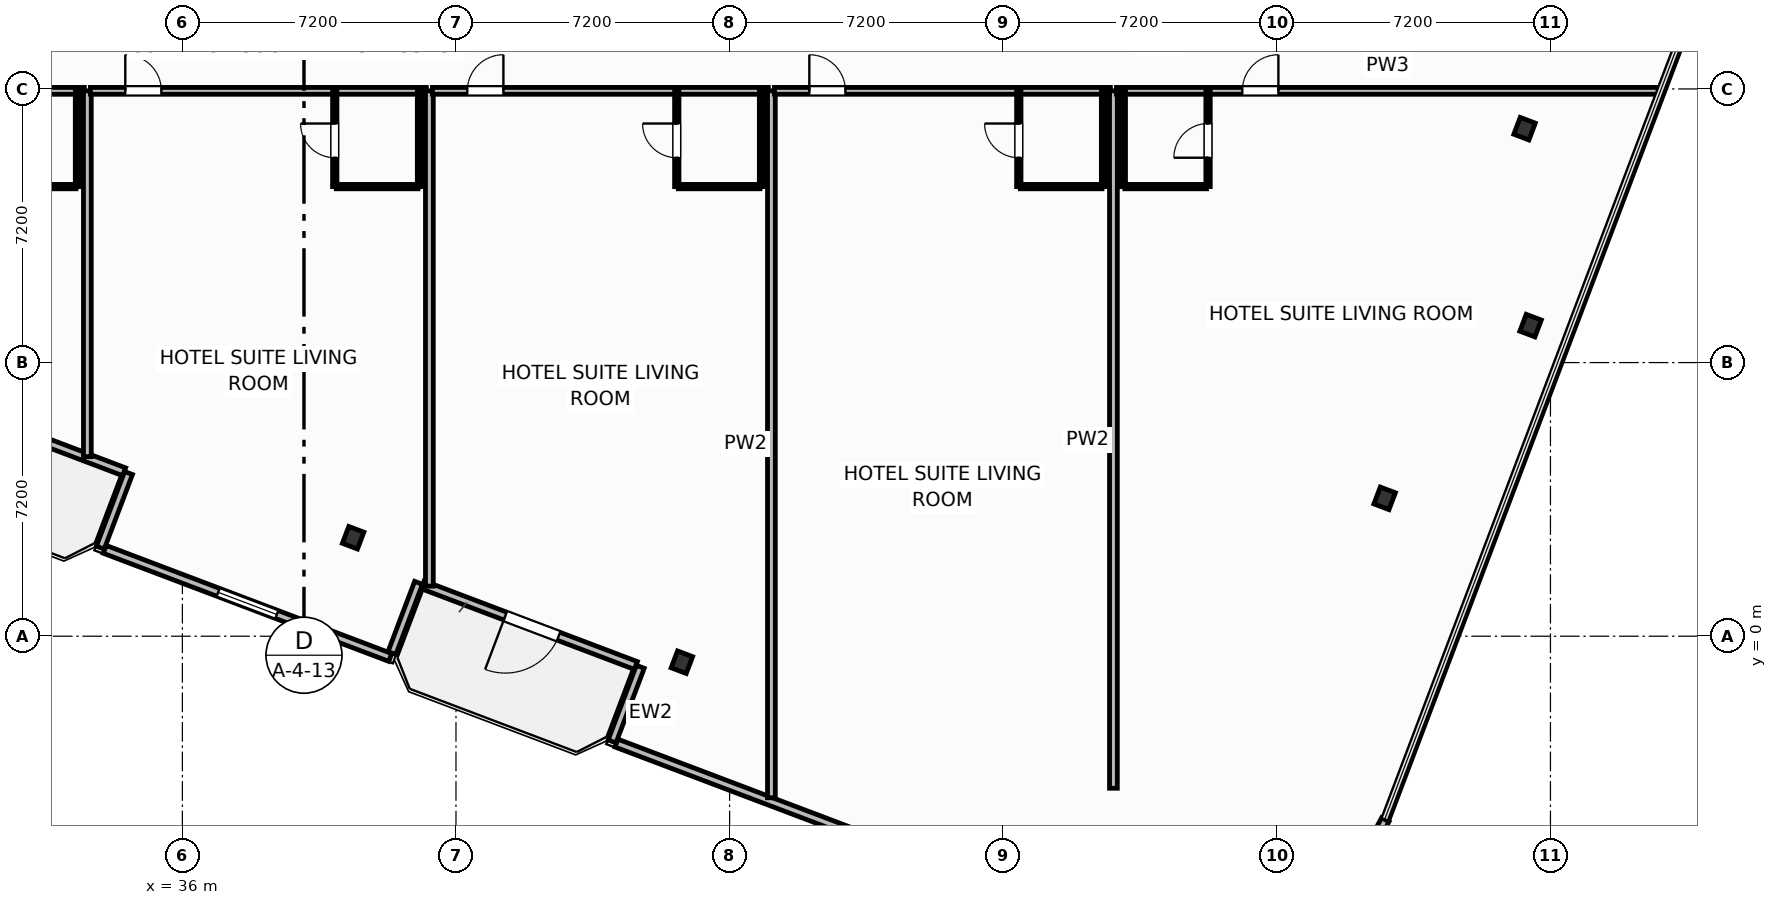
"""IFC4 building model, lengths in metres.
Left out: names, types, materials, properties, quantities, classifications, styles, units other than length and angle.
Written with IfcOpenShell. Run it as: python <this file> out.ifc"""

import sys

from ifc_helpers import new_model, si_unit, direction, frame, frame_2d, origin, origin_2d, place, context, subcontext, project, spatial, rectangle, i_section, extrude, element, fill, save


model = new_model("IFC4")
c1 = context("Model", 3, precision=1e-05, world=origin(), true_north=direction((0.0, 1.0)))
c2 = subcontext(c1, "Body", "Model", "MODEL_VIEW")
j1 = project(units=[si_unit("LENGTHUNIT", "METRE"), si_unit("PLANEANGLEUNIT", "RADIAN")], contexts=[c1])
p1 = place(None, origin())
s1 = spatial("IfcSite", under=j1, at=p1, CompositionType="ELEMENT")
p2 = place(p1, origin())
s2 = spatial("IfcBuilding", under=s1, at=p2, CompositionType="ELEMENT")
p3 = place(p2, frame((0.0, 0.0, 109.5)))
s3 = spatial("IfcBuildingStorey", under=s2, at=p3, CompositionType="ELEMENT", Elevation=109.5)
for number, where, z_axis, x_axis in (
    (1, (40.493, 2.591, 0.0), (0.0, 0.0, 1.0), (0.935, -0.354, 0.0)),
    (2, (49.144, -0.684, 0.0), (0.0, 0.0, 1.0), (0.935, -0.354, 0.0)),
    (3, (67.637, 3.628, 0.0), (0.0, 0.0, 1.0), (0.935, -0.354, 0.0)),
    (4, (71.477, 8.173, 0.0), (0.0, 0.0, 1.0), (0.935, -0.354, 0.0)),
    (5, (71.319, 13.354, 0.0), (0.0, 0.0, 1.0), (0.935, -0.354, 0.0)),
):
    element("IfcColumn", number, at=place(p3, frame(where, z_axis=z_axis, x_axis=x_axis)), inside=s3, PredefinedType="COLUMN", context=c2, shape_type="SweptSolid", body=[
        extrude(i_section(OverallWidth=0.424, OverallDepth=0.474, WebThickness=0.048, FlangeThickness=0.077, FilletRadius=0.025, at=origin_2d()), origin(), (0.0, 0.0, 1.0), 3.7),
    ])
p4 = place(p3, frame((34.468, 4.327, 0.0), z_axis=(0.0, 0.0, 1.0), x_axis=(-0.9352192676, 0.354069091436, 0.0)))
e6 = element("IfcWall", 6, at=p4, inside=s3, PredefinedType="SOLIDWALL", context=c2, shape_type="SweptSolid", body=[
    extrude(rectangle(XDim=6.0, YDim=0.22, at=frame_2d((3.0, 0.0))), origin(), (0.0, 0.0, 1.0), 2.73),
])
p5 = place(p4, frame((3.508, 0.0, 0.0)))
e7 = element("IfcOpeningElement", 7, at=p5, cuts=e6, PredefinedType="OPENING", context=c2, shape_type="SweptSolid", body=[
    extrude(rectangle(XDim=1.5, YDim=2.25, at=frame_2d((0.75, 1.125))), frame((0.0, 0.12, 0.0), z_axis=(0.0, -1.0, 0.0), x_axis=(1.0, 0.0, 0.0)), (0.0, 0.0, 1.0), 0.24),
])
p6 = place(p3, frame((47.935, -0.771, 0.0), z_axis=(0.0, 0.0, 1.0), x_axis=(-0.935227640088, 0.354046976001, 0.0)))
e8 = element("IfcWall", 8, at=p6, inside=s3, PredefinedType="SOLIDWALL", context=c2, shape_type="SweptSolid", body=[
    extrude(rectangle(XDim=6.0, YDim=0.22, at=frame_2d((3.0, 0.0))), origin(), (0.0, 0.0, 1.0), 2.73),
])
p7 = place(p6, frame((2.176, 0.0, 0.0)))
e9 = element("IfcOpeningElement", 9, at=p7, cuts=e8, PredefinedType="OPENING", context=c2, shape_type="SweptSolid", body=[
    extrude(rectangle(XDim=1.5, YDim=2.25, at=frame_2d((0.75, 1.125))), frame((0.0, 0.12, 0.0), z_axis=(0.0, -1.0, 0.0), x_axis=(1.0, 0.0, 0.0)), (0.0, 0.0, 1.0), 0.24),
])
p8 = place(p3, frame((34.583, 4.294, 0.0), z_axis=(0.0, 0.0, 1.0), x_axis=(-0.354128469405, -0.935196785258, 0.0)))
e10 = element("IfcWall", 10, at=p8, inside=s3, PredefinedType="SOLIDWALL", context=c2, shape_type="SweptSolid", body=[
    extrude(rectangle(XDim=2.1, YDim=0.22, at=frame_2d((1.05, 0.0))), origin(), (0.0, 0.0, 1.0), 2.73),
])
p9 = place(p3, frame((33.957, 2.286, 0.0), z_axis=(0.0, 0.0, 1.0), x_axis=(0.935220736163, -0.354065212427, 0.0)))
e11 = element("IfcWall", 11, at=p9, inside=s3, PredefinedType="SOLIDWALL", context=c2, shape_type="SweptSolid", body=[
    extrude(rectangle(XDim=8.035, YDim=0.22, at=frame_2d((4.018, 0.0))), origin(), (0.0, 0.0, 1.0), 2.73),
])
p10 = place(p9, frame((3.192, 0.0, 0.8)))
e12 = element("IfcOpeningElement", 12, at=p10, cuts=e11, PredefinedType="OPENING", context=c2, shape_type="SweptSolid", body=[
    extrude(rectangle(XDim=1.65, YDim=1.65, at=frame_2d((0.825, 0.825))), frame((0.0, 0.12, 0.0), z_axis=(0.0, -1.0, 0.0), x_axis=(1.0, 0.0, 0.0)), (0.0, 0.0, 1.0), 0.24),
])
p11 = place(p3, frame((41.516, -0.442, 0.0), z_axis=(0.0, 0.0, 1.0), x_axis=(0.354061611705, 0.935222099352, 0.0)))
e13 = element("IfcWall", 13, at=p11, inside=s3, PredefinedType="SOLIDWALL", context=c2, shape_type="SweptSolid", body=[
    extrude(rectangle(XDim=1.975, YDim=0.22, at=frame_2d((0.987, 0.0))), origin(), (0.0, 0.0, 1.0), 2.73),
])
p12 = place(p3, frame((48.051, -0.805, 0.0), z_axis=(0.0, 0.0, 1.0), x_axis=(-0.353988291547, -0.935249854022, 0.0)))
e14 = element("IfcWall", 14, at=p12, inside=s3, PredefinedType="SOLIDWALL", context=c2, shape_type="SweptSolid", body=[
    extrude(rectangle(XDim=2.1, YDim=0.22, at=frame_2d((1.05, 0.0))), origin(), (0.0, 0.0, 1.0), 2.73),
])
p13 = place(p3, frame((47.424, -2.813, 0.0), z_axis=(0.0, 0.0, 1.0), x_axis=(0.935225962032, -0.354051408614, 0.0)))
e15 = element("IfcWall", 15, at=p13, inside=s3, PredefinedType="SOLIDWALL", context=c2, shape_type="SweptSolid", body=[
    extrude(rectangle(XDim=14.347, YDim=0.22, at=frame_2d((7.173, 0.0))), origin(), (0.0, 0.0, 1.0), 2.73),
])
p14 = place(p13, frame((6.348, 0.0, 0.8)))
e16 = element("IfcOpeningElement", 16, at=p14, cuts=e15, PredefinedType="OPENING", context=c2, shape_type="SweptSolid", body=[
    extrude(rectangle(XDim=1.65, YDim=1.65, at=frame_2d((0.825, 0.825))), frame((0.0, 0.12, 0.0), z_axis=(0.0, -1.0, 0.0), x_axis=(1.0, 0.0, 0.0)), (0.0, 0.0, 1.0), 0.24),
])
p15 = place(p3, frame((67.015, -6.019, 0.0), z_axis=(0.0, 0.0, 1.0), x_axis=(0.473077364598, 0.881020889142, 0.0)))
e17 = element("IfcWall", 17, at=p15, inside=s3, PredefinedType="SOLIDWALL", context=c2, shape_type="SweptSolid", body=[
    extrude(rectangle(XDim=1.353, YDim=0.22, at=frame_2d((0.677, 0.0))), origin(), (0.0, 0.0, 1.0), 2.73),
])
p16 = place(p3, frame((24.58, 14.35, 0.0), z_axis=(0.0, 0.0, 1.0), x_axis=(1.0, 0.0, 0.0)))
e18 = element("IfcWall", 18, at=p16, inside=s3, PredefinedType="PARTITIONING", context=c2, shape_type="SweptSolid", body=[
    extrude(rectangle(XDim=8.84, YDim=0.18, at=frame_2d((4.42, 0.0))), origin(), (0.0, 0.0, 1.0), 3.45),
])
p17 = place(p16, frame((4.68, 0.0, 0.0)))
e19 = element("IfcOpeningElement", 19, at=p17, cuts=e18, PredefinedType="OPENING", context=c2, shape_type="SweptSolid", body=[
    extrude(rectangle(XDim=0.95, YDim=2.15, at=frame_2d((0.475, 1.075))), frame((0.0, 0.1, 0.0), z_axis=(0.0, -1.0, 0.0), x_axis=(1.0, 0.0, 0.0)), (0.0, 0.0, 1.0), 0.2),
])
p18 = place(p3, frame((31.05, 11.83, 0.0), z_axis=(0.0, 0.0, 1.0), x_axis=(1.0, 0.0, 0.0)))
e20 = element("IfcWall", 20, at=p18, inside=s3, PredefinedType="PARTITIONING", context=c2, shape_type="SweptSolid", body=[
    extrude(rectangle(XDim=2.15, YDim=0.115, at=frame_2d((1.075, 0.0))), origin(), (0.0, 0.0, 1.0), 2.972),
])
p19 = place(p3, frame((33.24, 11.83, 0.0), z_axis=(0.0, 0.0, 1.0), x_axis=(0.0, 1.0, 0.0)))
e21 = element("IfcWall", 21, at=p19, inside=s3, PredefinedType="PARTITIONING", context=c2, shape_type="SweptSolid", body=[
    extrude(rectangle(XDim=2.52, YDim=0.115, at=frame_2d((1.26, 0.0))), origin(), (0.0, 0.0, 1.0), 3.45),
])
p20 = place(p3, frame((33.5, 4.725, 0.0), z_axis=(0.0, 0.0, 1.0), x_axis=(0.0, 1.0, 0.0)))
e22 = element("IfcWall", 22, at=p20, inside=s3, PredefinedType="PARTITIONING", context=c2, shape_type="SweptSolid", body=[
    extrude(rectangle(XDim=9.625, YDim=0.205, at=frame_2d((4.812, 0.0))), origin(), (0.0, 0.0, 1.0), 3.45),
])
p21 = place(p3, frame((33.58, 14.35, 0.0), z_axis=(0.0, 0.0, 1.0), x_axis=(1.0, 0.0, 0.0)))
e23 = element("IfcWall", 23, at=p21, inside=s3, PredefinedType="PARTITIONING", context=c2, shape_type="SweptSolid", body=[
    extrude(rectangle(XDim=8.84, YDim=0.18, at=frame_2d((4.42, 0.0))), origin(), (0.0, 0.0, 1.0), 3.45),
])
p22 = place(p21, frame((0.918, 0.0, 0.0)))
e24 = element("IfcOpeningElement", 24, at=p22, cuts=e23, PredefinedType="OPENING", context=c2, shape_type="SweptSolid", body=[
    extrude(rectangle(XDim=0.95, YDim=2.15, at=frame_2d((0.475, 1.075))), frame((0.0, 0.1, 0.0), z_axis=(0.0, -1.0, 0.0), x_axis=(1.0, 0.0, 0.0)), (0.0, 0.0, 1.0), 0.2),
])
p23 = place(p3, frame((40.05, 11.83, 0.0), z_axis=(0.0, 0.0, 1.0), x_axis=(1.0, 0.0, 0.0)))
e25 = element("IfcWall", 25, at=p23, inside=s3, PredefinedType="PARTITIONING", context=c2, shape_type="SweptSolid", body=[
    extrude(rectangle(XDim=2.15, YDim=0.115, at=frame_2d((1.075, 0.0))), origin(), (0.0, 0.0, 1.0), 3.45),
])
p24 = place(p3, frame((40.01, 11.83, 0.0), z_axis=(0.0, 0.0, 1.0), x_axis=(0.0, 1.0, 0.0)))
e26 = element("IfcWall", 26, at=p24, inside=s3, PredefinedType="PARTITIONING", context=c2, shape_type="SweptSolid", body=[
    extrude(rectangle(XDim=2.52, YDim=0.115, at=frame_2d((1.26, 0.0))), origin(), (0.0, 0.0, 1.0), 3.45),
])
p25 = place(p24, frame((0.76, 0.0, 0.0)))
e27 = element("IfcOpeningElement", 27, at=p25, cuts=e26, PredefinedType="OPENING", context=c2, shape_type="SweptSolid", body=[
    extrude(rectangle(XDim=0.9, YDim=2.05, at=frame_2d((0.45, 1.025))), frame((0.0, 0.067, 0.0), z_axis=(0.0, -1.0, 0.0), x_axis=(1.0, 0.0, 0.0)), (0.0, 0.0, 1.0), 0.135),
])
p26 = place(p3, frame((42.24, 11.83, 0.0), z_axis=(0.0, 0.0, 1.0), x_axis=(0.0, 1.0, 0.0)))
e28 = element("IfcWall", 28, at=p26, inside=s3, PredefinedType="PARTITIONING", context=c2, shape_type="SweptSolid", body=[
    extrude(rectangle(XDim=2.52, YDim=0.115, at=frame_2d((1.26, 0.0))), origin(), (0.0, 0.0, 1.0), 3.45),
])
p27 = place(p3, frame((42.5, 1.318, 0.0), z_axis=(0.0, 0.0, 1.0), x_axis=(0.0, 1.0, 0.0)))
e29 = element("IfcWall", 29, at=p27, inside=s3, PredefinedType="PARTITIONING", context=c2, shape_type="SweptSolid", body=[
    extrude(rectangle(XDim=13.032, YDim=0.205, at=frame_2d((6.516, 0.0))), origin(), (0.0, 0.0, 1.0), 2.58),
])
p28 = place(p3, frame((42.58, 14.35, 0.0), z_axis=(0.0, 0.0, 1.0), x_axis=(1.0, 0.0, 0.0)))
e30 = element("IfcWall", 30, at=p28, inside=s3, PredefinedType="PARTITIONING", context=c2, shape_type="SweptSolid", body=[
    extrude(rectangle(XDim=8.84, YDim=0.18, at=frame_2d((4.42, 0.0))), origin(), (0.0, 0.0, 1.0), 3.45),
])
p29 = place(p28, frame((0.918, 0.0, 0.0)))
e31 = element("IfcOpeningElement", 31, at=p29, cuts=e30, PredefinedType="OPENING", context=c2, shape_type="SweptSolid", body=[
    extrude(rectangle(XDim=0.95, YDim=2.15, at=frame_2d((0.475, 1.075))), frame((0.0, 0.1, 0.0), z_axis=(0.0, -1.0, 0.0), x_axis=(1.0, 0.0, 0.0)), (0.0, 0.0, 1.0), 0.2),
])
p30 = place(p3, frame((49.05, 11.83, 0.0), z_axis=(0.0, 0.0, 1.0), x_axis=(1.0, 0.0, 0.0)))
e32 = element("IfcWall", 32, at=p30, inside=s3, PredefinedType="PARTITIONING", context=c2, shape_type="SweptSolid", body=[
    extrude(rectangle(XDim=2.15, YDim=0.115, at=frame_2d((1.075, 0.0))), origin(), (0.0, 0.0, 1.0), 3.45),
])
p31 = place(p3, frame((49.01, 11.83, 0.0), z_axis=(0.0, 0.0, 1.0), x_axis=(0.0, 1.0, 0.0)))
e33 = element("IfcWall", 33, at=p31, inside=s3, PredefinedType="PARTITIONING", context=c2, shape_type="SweptSolid", body=[
    extrude(rectangle(XDim=2.52, YDim=0.115, at=frame_2d((1.26, 0.0))), origin(), (0.0, 0.0, 1.0), 3.45),
])
p32 = place(p31, frame((0.76, 0.0, 0.0)))
e34 = element("IfcOpeningElement", 34, at=p32, cuts=e33, PredefinedType="OPENING", context=c2, shape_type="SweptSolid", body=[
    extrude(rectangle(XDim=0.9, YDim=2.05, at=frame_2d((0.45, 1.025))), frame((0.0, 0.067, 0.0), z_axis=(0.0, -1.0, 0.0), x_axis=(1.0, 0.0, 0.0)), (0.0, 0.0, 1.0), 0.135),
])
p33 = place(p3, frame((51.24, 11.83, 0.0), z_axis=(0.0, 0.0, 1.0), x_axis=(0.0, 1.0, 0.0)))
e35 = element("IfcWall", 35, at=p33, inside=s3, PredefinedType="PARTITIONING", context=c2, shape_type="SweptSolid", body=[
    extrude(rectangle(XDim=2.52, YDim=0.115, at=frame_2d((1.26, 0.0))), origin(), (0.0, 0.0, 1.0), 3.45),
])
p34 = place(p3, frame((51.5, -4.251, 0.0), z_axis=(0.0, 0.0, 1.0), x_axis=(0.0, 1.0, 0.0)))
e36 = element("IfcWall", 36, at=p34, inside=s3, PredefinedType="PARTITIONING", context=c2, shape_type="SweptSolid", body=[
    extrude(rectangle(XDim=18.601, YDim=0.205, at=frame_2d((9.301, 0.0))), origin(), (0.0, 0.0, 1.0), 2.58),
])
p35 = place(p3, frame((51.58, 14.35, 0.0), z_axis=(0.0, 0.0, 1.0), x_axis=(1.0, 0.0, 0.0)))
e37 = element("IfcWall", 37, at=p35, inside=s3, PredefinedType="PARTITIONING", context=c2, shape_type="SweptSolid", body=[
    extrude(rectangle(XDim=8.84, YDim=0.18, at=frame_2d((4.42, 0.0))), origin(), (0.0, 0.0, 1.0), 3.45),
])
p36 = place(p35, frame((0.918, 0.0, 0.0)))
e38 = element("IfcOpeningElement", 38, at=p36, cuts=e37, PredefinedType="OPENING", context=c2, shape_type="SweptSolid", body=[
    extrude(rectangle(XDim=0.95, YDim=2.15, at=frame_2d((0.475, 1.075))), frame((0.0, 0.1, 0.0), z_axis=(0.0, -1.0, 0.0), x_axis=(1.0, 0.0, 0.0)), (0.0, 0.0, 1.0), 0.2),
])
p37 = place(p3, frame((58.05, 11.83, 0.0), z_axis=(0.0, 0.0, 1.0), x_axis=(1.0, 0.0, 0.0)))
e39 = element("IfcWall", 39, at=p37, inside=s3, PredefinedType="PARTITIONING", context=c2, shape_type="SweptSolid", body=[
    extrude(rectangle(XDim=2.15, YDim=0.115, at=frame_2d((1.075, 0.0))), origin(), (0.0, 0.0, 1.0), 3.45),
])
p38 = place(p3, frame((58.01, 11.83, 0.0), z_axis=(0.0, 0.0, 1.0), x_axis=(0.0, 1.0, 0.0)))
e40 = element("IfcWall", 40, at=p38, inside=s3, PredefinedType="PARTITIONING", context=c2, shape_type="SweptSolid", body=[
    extrude(rectangle(XDim=2.52, YDim=0.115, at=frame_2d((1.26, 0.0))), origin(), (0.0, 0.0, 1.0), 3.45),
])
p39 = place(p38, frame((0.76, 0.0, 0.0)))
e41 = element("IfcOpeningElement", 41, at=p39, cuts=e40, PredefinedType="OPENING", context=c2, shape_type="SweptSolid", body=[
    extrude(rectangle(XDim=0.9, YDim=2.05, at=frame_2d((0.45, 1.025))), frame((0.0, 0.067, 0.0), z_axis=(0.0, -1.0, 0.0), x_axis=(1.0, 0.0, 0.0)), (0.0, 0.0, 1.0), 0.135),
])
p40 = place(p3, frame((60.24, 11.83, 0.0), z_axis=(0.0, 0.0, 1.0), x_axis=(0.0, 1.0, 0.0)))
e42 = element("IfcWall", 42, at=p40, inside=s3, PredefinedType="PARTITIONING", context=c2, shape_type="SweptSolid", body=[
    extrude(rectangle(XDim=2.52, YDim=0.115, at=frame_2d((1.26, 0.0))), origin(), (0.0, 0.0, 1.0), 3.45),
])
p41 = place(p3, frame((60.5, -4.0, 0.0), z_axis=(0.0, 0.0, 1.0), x_axis=(0.0, 1.0, 0.0)))
e43 = element("IfcWall", 43, at=p41, inside=s3, PredefinedType="PARTITIONING", context=c2, shape_type="SweptSolid", body=[
    extrude(rectangle(XDim=18.35, YDim=0.205, at=frame_2d((9.175, 0.0))), origin(), (0.0, 0.0, 1.0), 3.45),
])
p42 = place(p3, frame((60.58, 14.35, 0.0), z_axis=(0.0, 0.0, 1.0), x_axis=(1.0, 0.0, 0.0)))
e44 = element("IfcWall", 44, at=p42, inside=s3, PredefinedType="PARTITIONING", context=c2, shape_type="SweptSolid", body=[
    extrude(rectangle(XDim=14.275, YDim=0.18, at=frame_2d((7.138, 0.0))), origin(), (0.0, 0.0, 1.0), 2.58),
])
p43 = place(p42, frame((3.311, 0.0, 0.0)))
e45 = element("IfcOpeningElement", 45, at=p43, cuts=e44, PredefinedType="OPENING", context=c2, shape_type="SweptSolid", body=[
    extrude(rectangle(XDim=0.95, YDim=2.15, at=frame_2d((0.475, 1.075))), frame((0.0, 0.1, 0.0), z_axis=(0.0, -1.0, 0.0), x_axis=(1.0, 0.0, 0.0)), (0.0, 0.0, 1.0), 0.2),
])
p44 = place(p3, frame((60.8, 11.83, 0.0), z_axis=(0.0, 0.0, 1.0), x_axis=(1.0, 0.0, 0.0)))
e46 = element("IfcWall", 46, at=p44, inside=s3, PredefinedType="PARTITIONING", context=c2, shape_type="SweptSolid", body=[
    extrude(rectangle(XDim=2.15, YDim=0.115, at=frame_2d((1.075, 0.0))), origin(), (0.0, 0.0, 1.0), 3.45),
])
p45 = place(p3, frame((62.99, 11.83, 0.0), z_axis=(0.0, 0.0, 1.0), x_axis=(0.0, 1.0, 0.0)))
e47 = element("IfcWall", 47, at=p45, inside=s3, PredefinedType="PARTITIONING", context=c2, shape_type="SweptSolid", body=[
    extrude(rectangle(XDim=2.52, YDim=0.115, at=frame_2d((1.26, 0.0))), origin(), (0.0, 0.0, 1.0), 2.972),
])
p46 = place(p45, frame((0.76, 0.0, 0.0)))
e48 = element("IfcOpeningElement", 48, at=p46, cuts=e47, PredefinedType="OPENING", context=c2, shape_type="SweptSolid", body=[
    extrude(rectangle(XDim=0.9, YDim=2.05, at=frame_2d((0.45, 1.025))), frame((0.0, 0.067, 0.0), z_axis=(0.0, -1.0, 0.0), x_axis=(1.0, 0.0, 0.0)), (0.0, 0.0, 1.0), 0.135),
])
p47 = place(p3, frame((60.76, 11.83, 0.0), z_axis=(0.0, 0.0, 1.0), x_axis=(0.0, 1.0, 0.0)))
e49 = element("IfcWall", 49, at=p47, inside=s3, PredefinedType="PARTITIONING", context=c2, shape_type="SweptSolid", body=[
    extrude(rectangle(XDim=2.52, YDim=0.115, at=frame_2d((1.26, 0.0))), origin(), (0.0, 0.0, 1.0), 3.45),
])
p48 = place(p7, origin())
e50 = element("IfcDoor", 50, at=p48, inside=s3, OperationType="SINGLE_SWING_RIGHT", PredefinedType="DOOR", context=c2, shape_type="SweptSolid", body=[
    extrude(rectangle(XDim=1.5, YDim=2.25, at=frame_2d((0.75, 1.125))), frame((0.0, 0.025, 0.0), z_axis=(0.0, -1.0, 0.0), x_axis=(1.0, 0.0, 0.0)), (0.0, 0.0, 1.0), 0.05),
])
fill(e9, e50)
p49 = place(p10, origin())
e51 = element("IfcWindow", 51, at=p49, inside=s3, PartitioningType="SINGLE_PANEL", PredefinedType="WINDOW", context=c2, shape_type="SweptSolid", body=[
    extrude(rectangle(XDim=1.65, YDim=1.65, at=frame_2d((0.825, 0.825))), frame((0.0, 0.03, 0.0), z_axis=(0.0, -1.0, 0.0), x_axis=(1.0, 0.0, 0.0)), (0.0, 0.0, 1.0), 0.06),
])
fill(e12, e51)
p50 = place(p22, origin())
e52 = element("IfcDoor", 52, at=p50, inside=s3, OperationType="SINGLE_SWING_LEFT", PredefinedType="DOOR", context=c2, shape_type="SweptSolid", body=[
    extrude(rectangle(XDim=0.95, YDim=2.15, at=frame_2d((0.475, 1.075))), frame((0.0, 0.025, 0.0), z_axis=(0.0, -1.0, 0.0), x_axis=(1.0, 0.0, 0.0)), (0.0, 0.0, 1.0), 0.05),
])
fill(e24, e52)
p51 = place(p25, origin())
e53 = element("IfcDoor", 53, at=p51, inside=s3, OperationType="SINGLE_SWING_RIGHT", PredefinedType="DOOR", context=c2, shape_type="SweptSolid", body=[
    extrude(rectangle(XDim=0.9, YDim=2.05, at=frame_2d((0.45, 1.025))), frame((0.0, 0.025, 0.0), z_axis=(0.0, -1.0, 0.0), x_axis=(1.0, 0.0, 0.0)), (0.0, 0.0, 1.0), 0.05),
])
fill(e27, e53)
p52 = place(p29, origin())
e54 = element("IfcDoor", 54, at=p52, inside=s3, OperationType="SINGLE_SWING_RIGHT", PredefinedType="DOOR", context=c2, shape_type="SweptSolid", body=[
    extrude(rectangle(XDim=0.95, YDim=2.15, at=frame_2d((0.475, 1.075))), frame((0.0, 0.025, 0.0), z_axis=(0.0, -1.0, 0.0), x_axis=(1.0, 0.0, 0.0)), (0.0, 0.0, 1.0), 0.05),
])
fill(e31, e54)
p53 = place(p32, origin())
e55 = element("IfcDoor", 55, at=p53, inside=s3, OperationType="SINGLE_SWING_RIGHT", PredefinedType="DOOR", context=c2, shape_type="SweptSolid", body=[
    extrude(rectangle(XDim=0.9, YDim=2.05, at=frame_2d((0.45, 1.025))), frame((0.0, 0.025, 0.0), z_axis=(0.0, -1.0, 0.0), x_axis=(1.0, 0.0, 0.0)), (0.0, 0.0, 1.0), 0.05),
])
fill(e34, e55)
p54 = place(p36, origin())
e56 = element("IfcDoor", 56, at=p54, inside=s3, OperationType="SINGLE_SWING_LEFT", PredefinedType="DOOR", context=c2, shape_type="SweptSolid", body=[
    extrude(rectangle(XDim=0.95, YDim=2.15, at=frame_2d((0.475, 1.075))), frame((0.0, 0.025, 0.0), z_axis=(0.0, -1.0, 0.0), x_axis=(1.0, 0.0, 0.0)), (0.0, 0.0, 1.0), 0.05),
])
fill(e38, e56)
p55 = place(p39, origin())
e57 = element("IfcDoor", 57, at=p55, inside=s3, OperationType="SINGLE_SWING_RIGHT", PredefinedType="DOOR", context=c2, shape_type="SweptSolid", body=[
    extrude(rectangle(XDim=0.9, YDim=2.05, at=frame_2d((0.45, 1.025))), frame((0.0, 0.025, 0.0), z_axis=(0.0, -1.0, 0.0), x_axis=(1.0, 0.0, 0.0)), (0.0, 0.0, 1.0), 0.05),
])
fill(e41, e57)
p56 = place(p43, origin())
e58 = element("IfcDoor", 58, at=p56, inside=s3, OperationType="SINGLE_SWING_RIGHT", PredefinedType="DOOR", context=c2, shape_type="SweptSolid", body=[
    extrude(rectangle(XDim=0.95, YDim=2.15, at=frame_2d((0.475, 1.075))), frame((0.0, 0.025, 0.0), z_axis=(0.0, -1.0, 0.0), x_axis=(1.0, 0.0, 0.0)), (0.0, 0.0, 1.0), 0.05),
])
fill(e45, e58)
p57 = place(p46, origin())
e59 = element("IfcDoor", 59, at=p57, inside=s3, OperationType="SINGLE_SWING_LEFT", PredefinedType="DOOR", context=c2, shape_type="SweptSolid", body=[
    extrude(rectangle(XDim=0.9, YDim=2.05, at=frame_2d((0.45, 1.025))), frame((0.0, 0.025, 0.0), z_axis=(0.0, -1.0, 0.0), x_axis=(1.0, 0.0, 0.0)), (0.0, 0.0, 1.0), 0.05),
])
fill(e48, e59)
save(model, sys.argv[1])
